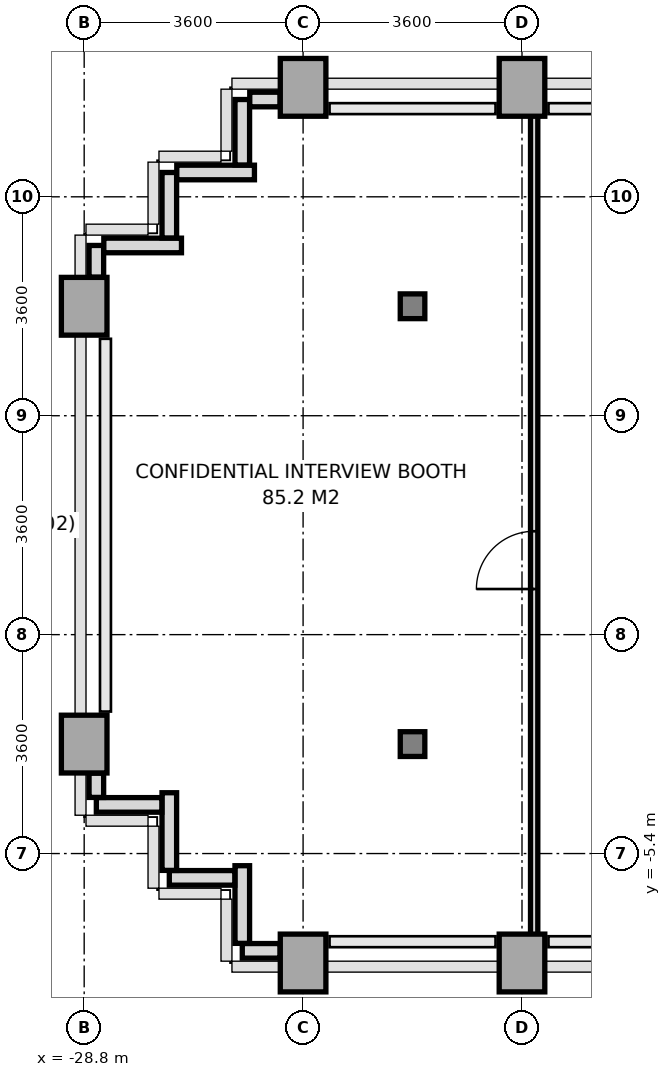
"""IFC4 building model, lengths in metres.
Left out: names, types, materials, properties, quantities, classifications, styles, units other than length and angle.
Written with IfcOpenShell. Run it as: python <this file> out.ifc"""

import sys

from ifc_helpers import new_model, si_unit, direction, frame, frame_2d, origin, origin_2d, place, context, subcontext, project, spatial, rectangle, i_section, extrude, source, transform, mapped, element, fill, save


model = new_model("IFC4")
c1 = context("Model", 3, precision=1e-05, world=origin(), true_north=direction((0.0, 1.0)))
c2 = subcontext(c1, "Body", "Model", "MODEL_VIEW")
j1 = project(units=[si_unit("LENGTHUNIT", "METRE"), si_unit("PLANEANGLEUNIT", "RADIAN")], contexts=[c1])
p1 = place(None, origin())
s1 = spatial("IfcSite", under=j1, at=p1, CompositionType="ELEMENT")
p2 = place(p1, origin())
s2 = spatial("IfcBuilding", under=s1, at=p2, CompositionType="ELEMENT")
p3 = place(p2, frame((0.0, 0.0, 68.0)))
s3 = spatial("IfcBuildingStorey", under=s2, at=p3, CompositionType="ELEMENT", Elevation=68.0)
m1 = source(origin(), c2, "Body", "SweptSolid", [
    extrude(rectangle(XDim=0.75, YDim=0.95, at=origin_2d()), origin(), (0.0, 0.0, 1.0), 3.2),
])
for number, where, z_axis, x_axis in (
    (1, (-28.8, -3.6, 0.0), (0.0, 0.0, 1.0), (1.0, 0.0, 0.0)),
    (2, (-28.8, 3.6, 0.0), (0.0, 0.0, 1.0), (1.0, 0.0, 0.0)),
    (3, (-25.2, -7.2, 0.0), (0.0, 0.0, 1.0), (1.0, 0.0, 0.0)),
    (4, (-25.2, 7.2, 0.0), (0.0, 0.0, 1.0), (1.0, 0.0, 0.0)),
):
    element("IfcColumn", number, at=place(p3, frame(where, z_axis=z_axis, x_axis=x_axis)), inside=s3, PredefinedType="COLUMN", context=c2, shape_type="MappedRepresentation", body=[
        mapped(m1, transform((0.0, 0.0, 0.0), x_axis=(1.0, 0.0, 0.0), y_axis=(0.0, 1.0, 0.0), z_axis=(0.0, 0.0, 1.0), scale=1.0)),
    ])
m2 = source(origin(), c2, "Body", "SweptSolid", [
    extrude(i_section(OverallWidth=0.404, OverallDepth=0.407, WebThickness=0.022, FlangeThickness=0.035, at=origin_2d()), origin(), (0.0, 0.0, 1.0), 3.2),
])
for number, where, z_axis, x_axis in (
    (5, (-23.4, -3.6, 0.0), (0.0, 0.0, 1.0), (1.0, 0.0, 0.0)),
    (6, (-23.4, 3.6, 0.0), (0.0, 0.0, 1.0), (1.0, 0.0, 0.0)),
):
    element("IfcColumn", number, at=place(p3, frame(where, z_axis=z_axis, x_axis=x_axis)), inside=s3, PredefinedType="COLUMN", context=c2, shape_type="MappedRepresentation", body=[
        mapped(m2, transform((0.0, 0.0, 0.0), x_axis=(1.0, 0.0, 0.0), y_axis=(0.0, 1.0, 0.0), z_axis=(0.0, 0.0, 1.0), scale=1.0)),
    ])
for number, where, z_axis, x_axis in (
    (7, (-21.6, -7.2, 0.0), (0.0, 0.0, 1.0), (1.0, 0.0, 0.0)),
    (8, (-21.6, 7.2, 0.0), (0.0, 0.0, 1.0), (1.0, 0.0, 0.0)),
):
    element("IfcColumn", number, at=place(p3, frame(where, z_axis=z_axis, x_axis=x_axis)), inside=s3, PredefinedType="COLUMN", context=c2, shape_type="MappedRepresentation", body=[
        mapped(m1, transform((0.0, 0.0, 0.0), x_axis=(1.0, 0.0, 0.0), y_axis=(0.0, 1.0, 0.0), z_axis=(0.0, 0.0, 1.0), scale=1.0)),
    ])
p4 = place(p3, frame((-25.578, -7.0, 0.0), z_axis=(0.0, 0.0, 1.0), x_axis=(-1.0, 0.0, 0.0)))
e9 = element("IfcWall", 9, at=p4, inside=s3, PredefinedType="PARAPET", context=c2, shape_type="SweptSolid", body=[
    extrude(rectangle(XDim=0.622, YDim=0.24, at=frame_2d((0.311, 0.0))), origin(), (0.0, 0.0, 1.0), 1.15),
])
p5 = place(p3, frame((-26.2, -6.877, 0.0), z_axis=(0.0, 0.0, 1.0), x_axis=(0.0, 1.0, 0.0)))
e10 = element("IfcWall", 10, at=p5, inside=s3, PredefinedType="PARAPET", context=c2, shape_type="SweptSolid", body=[
    extrude(rectangle(XDim=1.277, YDim=0.24, at=frame_2d((0.638, 0.0))), origin(), (0.0, 0.0, 1.0), 1.15),
])
p6 = place(p3, frame((-26.323, -5.8, 0.0), z_axis=(0.0, 0.0, 1.0), x_axis=(-1.0, 0.0, 0.0)))
e11 = element("IfcWall", 11, at=p6, inside=s3, PredefinedType="PARAPET", context=c2, shape_type="SweptSolid", body=[
    extrude(rectangle(XDim=1.077, YDim=0.24, at=frame_2d((0.539, 0.0))), origin(), (0.0, 0.0, 1.0), 1.15),
])
p7 = place(p3, frame((-27.4, -5.677, 0.0), z_axis=(0.0, 0.0, 1.0), x_axis=(0.0, 1.0, 0.0)))
e12 = element("IfcWall", 12, at=p7, inside=s3, PredefinedType="PARAPET", context=c2, shape_type="SweptSolid", body=[
    extrude(rectangle(XDim=1.277, YDim=0.24, at=frame_2d((0.639, 0.0))), origin(), (0.0, 0.0, 1.0), 1.15),
])
p8 = place(p3, frame((-27.523, -4.6, 0.0), z_axis=(0.0, 0.0, 1.0), x_axis=(-1.0, 0.0, 0.0)))
e13 = element("IfcWall", 13, at=p8, inside=s3, PredefinedType="PARAPET", context=c2, shape_type="SweptSolid", body=[
    extrude(rectangle(XDim=1.077, YDim=0.24, at=frame_2d((0.539, 0.0))), origin(), (0.0, 0.0, 1.0), 1.15),
])
p9 = place(p3, frame((-28.6, -4.477, 0.0), z_axis=(0.0, 0.0, 1.0), x_axis=(0.0, 1.0, 0.0)))
e14 = element("IfcWall", 14, at=p9, inside=s3, PredefinedType="PARAPET", context=c2, shape_type="SweptSolid", body=[
    extrude(rectangle(XDim=0.399, YDim=0.24, at=frame_2d((0.2, 0.0))), origin(), (0.0, 0.0, 1.0), 1.15),
])
p10 = place(p3, frame((-28.6, 4.078, 0.0), z_axis=(0.0, 0.0, 1.0), x_axis=(0.0, 1.0, 0.0)))
e15 = element("IfcWall", 15, at=p10, inside=s3, PredefinedType="PARAPET", context=c2, shape_type="SweptSolid", body=[
    extrude(rectangle(XDim=0.522, YDim=0.24, at=frame_2d((0.261, 0.0))), origin(), (0.0, 0.0, 1.0), 1.15),
])
p11 = place(p3, frame((-28.477, 4.6, 0.0), z_axis=(0.0, 0.0, 1.0), x_axis=(1.0, 0.0, 0.0)))
e16 = element("IfcWall", 16, at=p11, inside=s3, PredefinedType="PARAPET", context=c2, shape_type="SweptSolid", body=[
    extrude(rectangle(XDim=1.277, YDim=0.24, at=frame_2d((0.639, 0.0))), origin(), (0.0, 0.0, 1.0), 1.15),
])
p12 = place(p3, frame((-27.4, 4.723, 0.0), z_axis=(0.0, 0.0, 1.0), x_axis=(0.0, 1.0, 0.0)))
e17 = element("IfcWall", 17, at=p12, inside=s3, PredefinedType="PARAPET", context=c2, shape_type="SweptSolid", body=[
    extrude(rectangle(XDim=1.077, YDim=0.24, at=frame_2d((0.539, 0.0))), origin(), (0.0, 0.0, 1.0), 1.15),
])
p13 = place(p3, frame((-27.277, 5.8, 0.0), z_axis=(0.0, 0.0, 1.0), x_axis=(1.0, 0.0, 0.0)))
e18 = element("IfcWall", 18, at=p13, inside=s3, PredefinedType="PARAPET", context=c2, shape_type="SweptSolid", body=[
    extrude(rectangle(XDim=1.277, YDim=0.24, at=frame_2d((0.639, 0.0))), origin(), (0.0, 0.0, 1.0), 1.15),
])
p14 = place(p3, frame((-26.2, 5.923, 0.0), z_axis=(0.0, 0.0, 1.0), x_axis=(0.0, 1.0, 0.0)))
e19 = element("IfcWall", 19, at=p14, inside=s3, PredefinedType="PARAPET", context=c2, shape_type="SweptSolid", body=[
    extrude(rectangle(XDim=1.077, YDim=0.24, at=frame_2d((0.539, 0.0))), origin(), (0.0, 0.0, 1.0), 1.15),
])
p15 = place(p3, frame((-26.077, 7.0, 0.0), z_axis=(0.0, 0.0, 1.0), x_axis=(1.0, 0.0, 0.0)))
e20 = element("IfcWall", 20, at=p15, inside=s3, PredefinedType="PARAPET", context=c2, shape_type="SweptSolid", body=[
    extrude(rectangle(XDim=0.499, YDim=0.24, at=frame_2d((0.25, 0.0))), origin(), (0.0, 0.0, 1.0), 1.15),
])
p16 = place(p3, frame((-21.4, -6.85, 0.0), z_axis=(0.0, 0.0, 1.0), x_axis=(0.0, 1.0, 0.0)))
e21 = element("IfcWall", 21, at=p16, inside=s3, PredefinedType="PARTITIONING", context=c2, shape_type="SweptSolid", body=[
    extrude(rectangle(XDim=13.7, YDim=0.12, at=frame_2d((6.85, 0.0))), origin(), (0.0, 0.0, 1.0), 2.71),
])
p17 = place(p16, frame((5.8, 0.0, 0.0)))
e22 = element("IfcOpeningElement", 22, at=p17, cuts=e21, PredefinedType="OPENING", context=c2, shape_type="SweptSolid", body=[
    extrude(rectangle(XDim=0.95, YDim=2.15, at=frame_2d((0.475, 1.075))), frame((0.0, 0.07, 0.0), z_axis=(0.0, -1.0, 0.0), x_axis=(1.0, 0.0, 0.0)), (0.0, 0.0, 1.0), 0.14),
])
m3 = source(origin(), c2, "Body", "SweptSolid", [
    extrude(rectangle(XDim=0.95, YDim=2.15, at=frame_2d((0.475, 1.075))), frame((0.0, 0.025, 0.0), z_axis=(0.0, -1.0, 0.0), x_axis=(1.0, 0.0, 0.0)), (0.0, 0.0, 1.0), 0.05),
])
p18 = place(p17, origin())
e23 = element("IfcDoor", 23, at=p18, inside=s3, OperationType="SINGLE_SWING_LEFT", PredefinedType="DOOR", context=c2, shape_type="MappedRepresentation", body=[
    mapped(m3, transform((0.0, 0.0, 0.0), x_axis=(1.0, 0.0, 0.0), y_axis=(0.0, 1.0, 0.0), z_axis=(0.0, 0.0, 1.0), scale=1.0)),
])
fill(e22, e23)
save(model, sys.argv[1])
